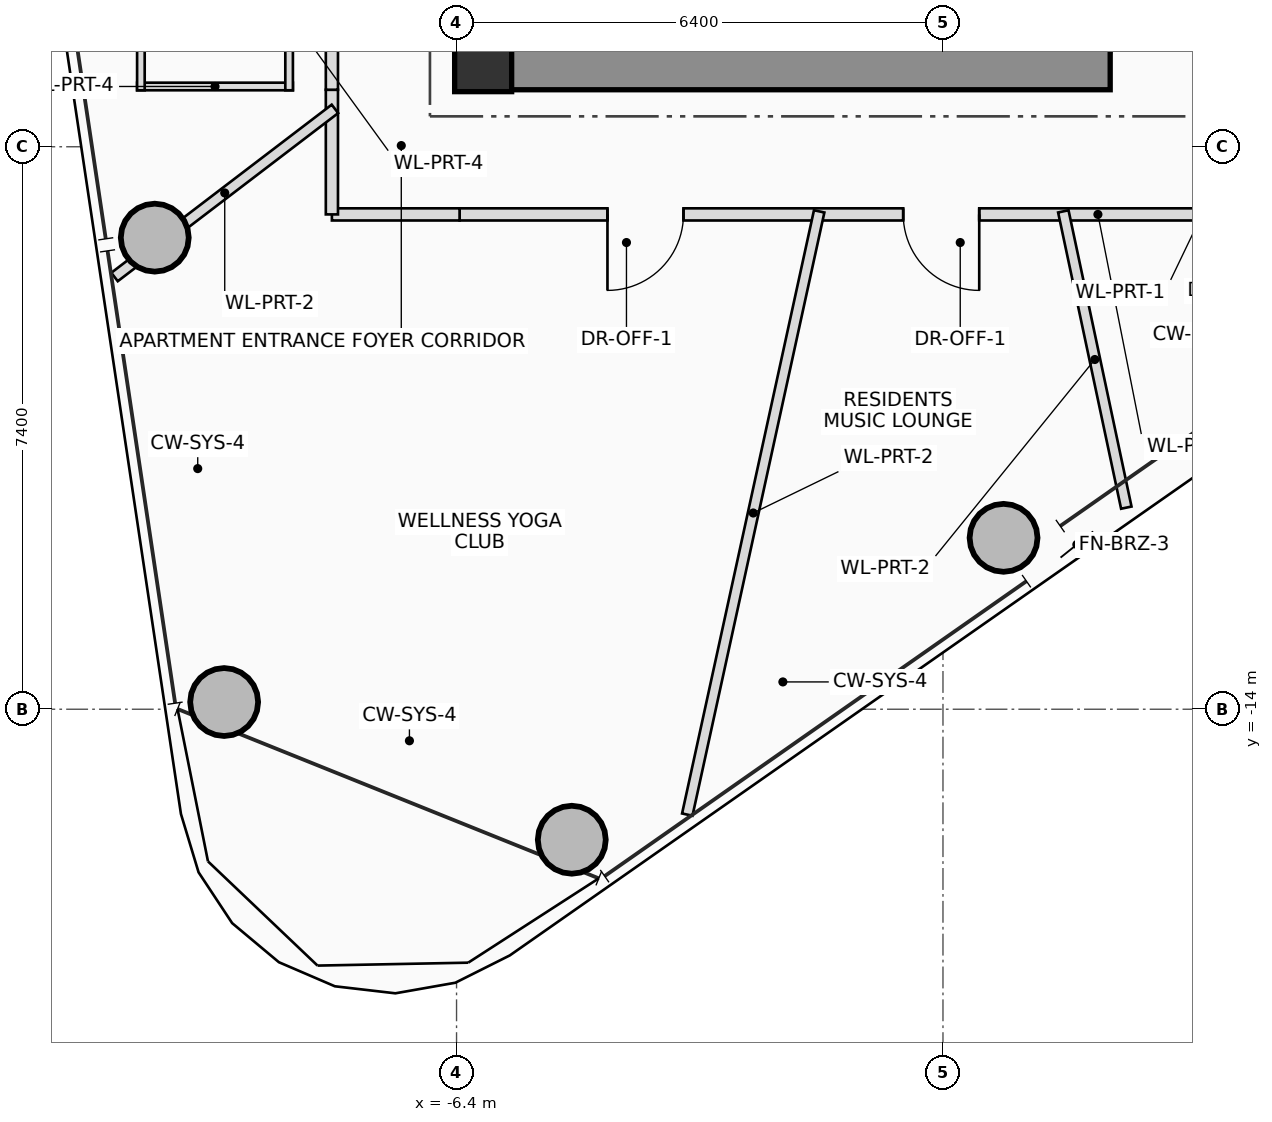
"""IFC4 building model, lengths in metres.
Left out: names, types, materials, properties, quantities, classifications, styles, units other than length and angle.
Written with IfcOpenShell. Run it as: python <this file> out.ifc"""

import sys

from ifc_helpers import new_model, si_unit, direction, frame, frame_2d, origin, origin_2d, place, context, subcontext, project, spatial, rectangle, hollow_circle, extrude, source, transform, mapped, element, fill, save


model = new_model("IFC4")
c1 = context("Model", 3, precision=1e-05, world=origin(), true_north=direction((0.0, 1.0)))
c2 = subcontext(c1, "Body", "Model", "MODEL_VIEW")
j1 = project(units=[si_unit("LENGTHUNIT", "METRE"), si_unit("PLANEANGLEUNIT", "RADIAN")], contexts=[c1])
p1 = place(None, origin())
s1 = spatial("IfcSite", under=j1, at=p1, CompositionType="ELEMENT")
p2 = place(p1, origin())
s2 = spatial("IfcBuilding", under=s1, at=p2, CompositionType="ELEMENT")
p3 = place(p2, frame((0.0, 0.0, 257.55)))
s3 = spatial("IfcBuildingStorey", under=s2, at=p3, CompositionType="ELEMENT", Elevation=257.55)
m1 = source(origin(), c2, "Body", "SweptSolid", [
    extrude(rectangle(XDim=0.75, YDim=0.75, at=origin_2d()), origin(), (0.0, 0.0, 1.0), 3.4),
])
p4 = place(p3, frame((-6.05, -5.5, 0.0), z_axis=(0.0, 0.0, 1.0), x_axis=(1.0, 0.0, 0.0)))
e1 = element("IfcColumn", 1, at=p4, inside=s3, PredefinedType="COLUMN", context=c2, shape_type="MappedRepresentation", body=[
    mapped(m1, transform((0.0, 0.0, 0.0), scale=1.0)),
])
p5 = place(p3, frame((-6.4, -5.575, 0.0), z_axis=(0.0, 0.0, 1.0), x_axis=(1.0, 0.0, 0.0)))
e2 = element("IfcWall", 2, at=p5, inside=s3, PredefinedType="SHEAR", context=c2, shape_type="SweptSolid", body=[
    extrude(rectangle(XDim=12.8, YDim=0.55, at=frame_2d((6.4, 0.0))), origin(), (0.0, 0.0, 1.0), 3.4),
])
p6 = place(p5, frame((8.6, 0.0, 0.0)))
e3 = element("IfcOpeningElement", 3, at=p6, cuts=e2, PredefinedType="OPENING", context=c2, shape_type="SweptSolid", body=[
    extrude(rectangle(XDim=1.2, YDim=2.2, at=frame_2d((0.6, 1.1))), frame((0.0, 0.285, 0.0), z_axis=(0.0, -1.0, 0.0), x_axis=(1.0, 0.0, 0.0)), (0.0, 0.0, 1.0), 0.57),
])
m2 = source(origin(), c2, "Body", "SweptSolid", [
    extrude(hollow_circle(Radius=0.45, WallThickness=0.032, at=origin_2d()), origin(), (0.0, 0.0, 1.0), 3.4),
])
for number, where, z_axis, x_axis in (
    (4, (-4.884, -15.717, 0.0), (0.0, 0.0, 1.0), (1.0, 0.0, 0.0)),
    (5, (0.797, -11.745, 0.0), (0.0, 0.0, 1.0), (1.0, 0.0, 0.0)),
    (6, (-10.371, -7.796, 0.0), (0.0, 0.0, 1.0), (1.0, 0.0, 0.0)),
    (7, (-9.458, -13.905, 0.0), (0.0, 0.0, 1.0), (1.0, 0.0, 0.0)),
):
    element("IfcColumn", number, at=place(p3, frame(where, z_axis=z_axis, x_axis=x_axis)), inside=s3, PredefinedType="COLUMN", context=c2, shape_type="MappedRepresentation", body=[
        mapped(m2, transform((0.0, 0.0, 0.0), scale=1.0)),
    ])
p7 = place(p3, frame((-8.553, -5.807, 0.0), z_axis=(0.0, 0.0, 1.0), x_axis=(-1.0, 0.0, 0.0)))
e8 = element("IfcWall", 8, at=p7, inside=s3, PredefinedType="PARTITIONING", context=c2, shape_type="SweptSolid", body=[
    extrude(rectangle(XDim=2.05, YDim=0.1, at=frame_2d((1.025, 0.0))), origin(), (0.0, 0.0, 1.0), 2.765),
])
p8 = place(p3, frame((-8.603, -3.857, 0.0), z_axis=(0.0, 0.0, 1.0), x_axis=(0.0, -1.0, 0.0)))
e9 = element("IfcWall", 9, at=p8, inside=s3, PredefinedType="PARTITIONING", context=c2, shape_type="SweptSolid", body=[
    extrude(rectangle(XDim=2.0, YDim=0.1, at=frame_2d((1.0, 0.0))), origin(), (0.0, 0.0, 1.0), 2.805),
])
p9 = place(p3, frame((-10.553, -5.857, 0.0), z_axis=(0.0, 0.0, 1.0), x_axis=(0.0, 1.0, 0.0)))
e10 = element("IfcWall", 10, at=p9, inside=s3, PredefinedType="PARTITIONING", context=c2, shape_type="SweptSolid", body=[
    extrude(rectangle(XDim=2.0, YDim=0.1, at=frame_2d((1.0, 0.0))), origin(), (0.0, 0.0, 1.0), 2.765),
])
p10 = place(p3, frame((3.45, -7.49, 0.0), z_axis=(0.0, 0.0, 1.0), x_axis=(-1.0, 0.0, 0.0)))
e11 = element("IfcWall", 11, at=p10, inside=s3, PredefinedType="PARTITIONING", context=c2, shape_type="SweptSolid", body=[
    extrude(rectangle(XDim=9.81, YDim=0.16, at=frame_2d((4.905, 0.0))), origin(), (0.0, 0.0, 1.0), 2.605),
])
p11 = place(p10, frame((2.973, 0.0, 0.0)))
e12 = element("IfcOpeningElement", 12, at=p11, cuts=e11, PredefinedType="OPENING", context=c2, shape_type="SweptSolid", body=[
    extrude(rectangle(XDim=1.0, YDim=2.25, at=frame_2d((0.5, 1.125))), frame((0.0, 0.09, 0.0), z_axis=(0.0, -1.0, 0.0), x_axis=(1.0, 0.0, 0.0)), (0.0, 0.0, 1.0), 0.18),
])
p12 = place(p10, frame((6.865, 0.0, 0.0)))
e13 = element("IfcOpeningElement", 13, at=p12, cuts=e11, PredefinedType="OPENING", context=c2, shape_type="SweptSolid", body=[
    extrude(rectangle(XDim=1.0, YDim=2.25, at=frame_2d((0.5, 1.125))), frame((0.0, 0.09, 0.0), z_axis=(0.0, -1.0, 0.0), x_axis=(1.0, 0.0, 0.0)), (0.0, 0.0, 1.0), 0.18),
])
p13 = place(p3, frame((-6.36, -7.49, 0.0), z_axis=(0.0, 0.0, 1.0), x_axis=(-1.0, 0.0, 0.0)))
e14 = element("IfcWall", 14, at=p13, inside=s3, PredefinedType="PARTITIONING", context=c2, shape_type="SweptSolid", body=[
    extrude(rectangle(XDim=1.68, YDim=0.16, at=frame_2d((0.84, 0.0))), origin(), (0.0, 0.0, 1.0), 2.605),
])
p14 = place(p3, frame((-8.04, -7.49, 0.0), z_axis=(0.0, 0.0, 1.0), x_axis=(0.0, 1.0, 0.0)))
e15 = element("IfcWall", 15, at=p14, inside=s3, PredefinedType="PARTITIONING", context=c2, shape_type="SweptSolid", body=[
    extrude(rectangle(XDim=1.64, YDim=0.16, at=frame_2d((0.82, 0.0))), origin(), (0.0, 0.0, 1.0), 2.605),
])
p15 = place(p3, frame((-8.04, -5.85, 0.0), z_axis=(0.0, 0.0, 1.0), x_axis=(0.0, 1.0, 0.0)))
e16 = element("IfcWall", 16, at=p15, inside=s3, PredefinedType="PARTITIONING", context=c2, shape_type="SweptSolid", body=[
    extrude(rectangle(XDim=11.7, YDim=0.16, at=frame_2d((5.85, 0.0))), origin(), (0.0, 0.0, 1.0), 2.605),
])
p16 = place(p15, frame((2.661, 0.0, 0.0)))
e17 = element("IfcOpeningElement", 17, at=p16, cuts=e16, PredefinedType="OPENING", context=c2, shape_type="SweptSolid", body=[
    extrude(rectangle(XDim=1.0, YDim=2.25, at=frame_2d((0.5, 1.125))), frame((0.0, 0.09, 0.0), z_axis=(0.0, -1.0, 0.0), x_axis=(1.0, 0.0, 0.0)), (0.0, 0.0, 1.0), 0.18),
])
p17 = place(p15, frame((7.771, 0.0, 0.0)))
e18 = element("IfcOpeningElement", 18, at=p17, cuts=e16, PredefinedType="OPENING", context=c2, shape_type="SweptSolid", body=[
    extrude(rectangle(XDim=1.0, YDim=2.25, at=frame_2d((0.5, 1.125))), frame((0.0, 0.09, 0.0), z_axis=(0.0, -1.0, 0.0), x_axis=(1.0, 0.0, 0.0)), (0.0, 0.0, 1.0), 0.18),
])
p18 = place(p3, frame((-8.0, -6.102, 0.0), z_axis=(0.0, 0.0, 1.0), x_axis=(-0.795138118829, -0.606428373335, 0.0)))
e19 = element("IfcWall", 19, at=p18, inside=s3, PredefinedType="PARTITIONING", context=c2, shape_type="SweptSolid", body=[
    extrude(rectangle(XDim=3.647, YDim=0.14, at=frame_2d((1.823, 0.0))), origin(), (0.0, 0.0, 1.0), 2.605),
])
p19 = place(p3, frame((-1.629, -7.45, 0.0), z_axis=(0.0, 0.0, 1.0), x_axis=(-0.213607255038, -0.976919618287, 0.0)))
e20 = element("IfcWall", 20, at=p19, inside=s3, PredefinedType="PARTITIONING", context=c2, shape_type="SweptSolid", body=[
    extrude(rectangle(XDim=8.124, YDim=0.14, at=frame_2d((4.062, 0.0))), origin(), (0.0, 0.0, 1.0), 2.765),
])
p20 = place(p3, frame((1.583, -7.45, 0.0), z_axis=(0.0, 0.0, 1.0), x_axis=(0.207930561362, -0.978143589485, 0.0)))
e21 = element("IfcWall", 21, at=p20, inside=s3, PredefinedType="PARTITIONING", context=c2, shape_type="SweptSolid", body=[
    extrude(rectangle(XDim=3.985, YDim=0.14, at=frame_2d((1.993, 0.0))), origin(), (0.0, 0.0, 1.0), 2.605),
])
p21 = place(p6, origin())
e22 = element("IfcDoor", 22, at=p21, inside=s3, OperationType="SINGLE_SWING_RIGHT", PredefinedType="DOOR", context=c2, shape_type="SweptSolid", body=[
    extrude(rectangle(XDim=1.2, YDim=2.2, at=frame_2d((0.6, 1.1))), frame((0.0, 0.025, 0.0), z_axis=(0.0, -1.0, 0.0), x_axis=(1.0, 0.0, 0.0)), (0.0, 0.0, 1.0), 0.05),
])
fill(e3, e22)
p22 = place(p11, origin())
e23 = element("IfcDoor", 23, at=p22, inside=s3, OperationType="SINGLE_SWING_LEFT", PredefinedType="DOOR", context=c2, shape_type="SweptSolid", body=[
    extrude(rectangle(XDim=1.0, YDim=2.25, at=frame_2d((0.5, 1.125))), frame((0.0, 0.025, 0.0), z_axis=(0.0, -1.0, 0.0), x_axis=(1.0, 0.0, 0.0)), (0.0, 0.0, 1.0), 0.05),
])
fill(e12, e23)
p23 = place(p12, origin())
e24 = element("IfcDoor", 24, at=p23, inside=s3, OperationType="SINGLE_SWING_RIGHT", PredefinedType="DOOR", context=c2, shape_type="SweptSolid", body=[
    extrude(rectangle(XDim=1.0, YDim=2.25, at=frame_2d((0.5, 1.125))), frame((0.0, 0.025, 0.0), z_axis=(0.0, -1.0, 0.0), x_axis=(1.0, 0.0, 0.0)), (0.0, 0.0, 1.0), 0.05),
])
fill(e13, e24)
save(model, sys.argv[1])
